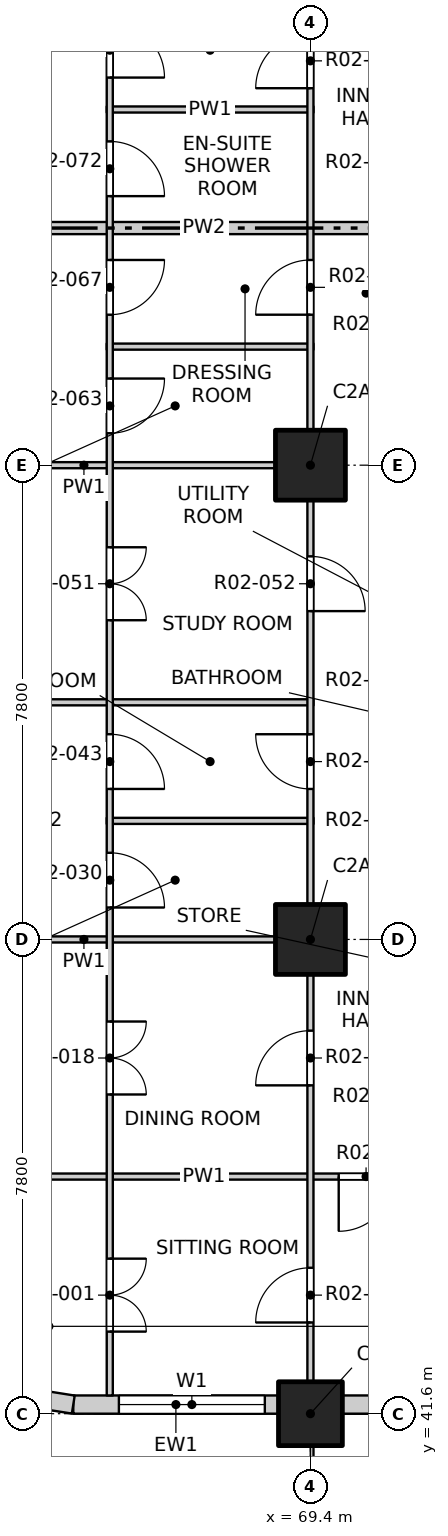
"""IFC4 building model, lengths in metres.
Left out: names, types, materials, properties, quantities, classifications, styles, units other than length and angle.
Written with IfcOpenShell. Run it as: python <this file> out.ifc"""

import sys

from ifc_helpers import new_model, si_unit, direction, frame, frame_2d, origin, origin_2d, place, context, subcontext, project, spatial, rectangle, extrude, element, fill, save


model = new_model("IFC4")
c1 = context("Model", 3, precision=1e-05, world=origin(), true_north=direction((0.0, 1.0)))
c2 = subcontext(c1, "Body", "Model", "MODEL_VIEW")
j1 = project(units=[si_unit("LENGTHUNIT", "METRE"), si_unit("PLANEANGLEUNIT", "RADIAN")], contexts=[c1])
p1 = place(None, origin())
s1 = spatial("IfcSite", under=j1, at=p1, CompositionType="ELEMENT")
p2 = place(p1, origin())
s2 = spatial("IfcBuilding", under=s1, at=p2, CompositionType="ELEMENT")
p3 = place(p2, frame((0.0, 0.0, 29.7)))
s3 = spatial("IfcBuildingStorey", under=s2, at=p3, CompositionType="ELEMENT", Elevation=29.7)
p4 = place(p3, frame((69.4, 41.6, -0.25), z_axis=(0.0, 0.0, 1.0), x_axis=(1.0, 0.0, 0.0)))
e1 = element("IfcColumn", 1, at=p4, inside=s3, PredefinedType="COLUMN", context=c2, shape_type="SweptSolid", body=[
    extrude(rectangle(XDim=1.05, YDim=1.05, at=origin_2d()), origin(), (0.0, 0.0, 1.0), 3.4),
])
for number, where, z_axis, x_axis in (
    (2, (69.4, 49.4, -0.25), (0.0, 0.0, 1.0), (1.0, 0.0, 0.0)),
    (3, (69.4, 57.2, -0.25), (0.0, 0.0, 1.0), (1.0, 0.0, 0.0)),
):
    element("IfcColumn", number, at=place(p3, frame(where, z_axis=z_axis, x_axis=x_axis)), inside=s3, PredefinedType="COLUMN", context=c2, shape_type="SweptSolid", body=[
        extrude(rectangle(XDim=1.15, YDim=1.15, at=origin_2d()), origin(), (0.0, 0.0, 1.0), 3.4),
    ])
p5 = place(p3, frame((65.5, 41.75, 0.0), z_axis=(0.0, 0.0, 1.0), x_axis=(1.0, 0.0, 0.0)))
e4 = element("IfcWall", 4, at=p5, inside=s3, PredefinedType="SOLIDWALL", context=c2, shape_type="SweptSolid", body=[
    extrude(rectangle(XDim=3.375, YDim=0.3, at=frame_2d((1.688, 0.0))), origin(), (0.0, 0.0, 1.0), 2.7),
])
p6 = place(p5, frame((0.75, 0.0, 0.9)))
e5 = element("IfcOpeningElement", 5, at=p6, cuts=e4, PredefinedType="OPENING", context=c2, shape_type="SweptSolid", body=[
    extrude(rectangle(XDim=2.4, YDim=1.8, at=frame_2d((1.2, 0.9))), frame((0.0, 0.16, 0.0), z_axis=(0.0, -1.0, 0.0), x_axis=(1.0, 0.0, 0.0)), (0.0, 0.0, 1.0), 0.32),
])
p7 = place(p3, frame((69.925, 41.75, 0.0), z_axis=(0.0, 0.0, 1.0), x_axis=(1.0, 0.0, 0.0)))
e6 = element("IfcWall", 6, at=p7, inside=s3, PredefinedType="SOLIDWALL", context=c2, shape_type="SweptSolid", body=[
    extrude(rectangle(XDim=6.75, YDim=0.3, at=frame_2d((3.375, 0.0))), origin(), (0.0, 0.0, 1.0), 2.7),
])
p8 = place(p7, frame((0.525, 0.0, 0.0)))
e7 = element("IfcOpeningElement", 7, at=p8, cuts=e6, PredefinedType="OPENING", context=c2, shape_type="SweptSolid", body=[
    extrude(rectangle(XDim=1.8, YDim=2.4, at=frame_2d((0.9, 1.2))), frame((0.0, 0.16, 0.0), z_axis=(0.0, -1.0, 0.0), x_axis=(1.0, 0.0, 0.0)), (0.0, 0.0, 1.0), 0.32),
])
p9 = place(p7, frame((4.125, 0.0, 0.9)))
e8 = element("IfcOpeningElement", 8, at=p9, cuts=e6, PredefinedType="OPENING", context=c2, shape_type="SweptSolid", body=[
    extrude(rectangle(XDim=2.4, YDim=1.8, at=frame_2d((1.2, 0.9))), frame((0.0, 0.16, 0.0), z_axis=(0.0, -1.0, 0.0), x_axis=(1.0, 0.0, 0.0)), (0.0, 0.0, 1.0), 0.32),
])
p10 = place(p3, frame((64.341, 41.934, 0.0), z_axis=(0.0, 0.0, 1.0), x_axis=(0.987678452879, -0.156496880861, 0.0)))
e9 = element("IfcWall", 9, at=p10, inside=s3, PredefinedType="SOLIDWALL", context=c2, shape_type="SweptSolid", body=[
    extrude(rectangle(XDim=1.173, YDim=0.3, at=frame_2d((0.586, 0.0))), origin(), (0.0, 0.0, 1.0), 2.7),
])
p11 = place(p3, frame((61.9, 45.5, 0.0), z_axis=(0.0, 0.0, 1.0), x_axis=(1.0, 0.0, 0.0)))
e10 = element("IfcWall", 10, at=p11, inside=s3, PredefinedType="PARTITIONING", context=c2, shape_type="SweptSolid", body=[
    extrude(rectangle(XDim=11.5, YDim=0.1, at=frame_2d((5.75, 0.0))), origin(), (0.0, 0.0, 1.0), 3.15),
])
p12 = place(p11, frame((7.965, 0.0, 0.0)))
e11 = element("IfcOpeningElement", 11, at=p12, cuts=e10, PredefinedType="OPENING", context=c2, shape_type="SweptSolid", body=[
    extrude(rectangle(XDim=0.9, YDim=2.1, at=frame_2d((0.45, 1.05))), frame((0.0, 0.06, 0.0), z_axis=(0.0, -1.0, 0.0), x_axis=(1.0, 0.0, 0.0)), (0.0, 0.0, 1.0), 0.12),
])
p13 = place(p3, frame((61.9, 49.4, 0.0), z_axis=(0.0, 0.0, 1.0), x_axis=(1.0, 0.0, 0.0)))
e12 = element("IfcWall", 12, at=p13, inside=s3, PredefinedType="PARTITIONING", context=c2, shape_type="SweptSolid", body=[
    extrude(rectangle(XDim=7.55, YDim=0.1, at=frame_2d((3.775, 0.0))), origin(), (0.0, 0.0, 1.0), 2.55),
])
p14 = place(p3, frame((66.05, 51.35, 0.0), z_axis=(0.0, 0.0, 1.0), x_axis=(1.0, 0.0, 0.0)))
e13 = element("IfcWall", 13, at=p14, inside=s3, PredefinedType="PARTITIONING", context=c2, shape_type="SweptSolid", body=[
    extrude(rectangle(XDim=3.4, YDim=0.1, at=frame_2d((1.7, 0.0))), origin(), (0.0, 0.0, 1.0), 3.15),
])
p15 = place(p3, frame((61.9, 53.3, 0.0), z_axis=(0.0, 0.0, 1.0), x_axis=(1.0, 0.0, 0.0)))
e14 = element("IfcWall", 14, at=p15, inside=s3, PredefinedType="PARTITIONING", context=c2, shape_type="SweptSolid", body=[
    extrude(rectangle(XDim=7.55, YDim=0.1, at=frame_2d((3.775, 0.0))), origin(), (0.0, 0.0, 1.0), 3.15),
])
p16 = place(p3, frame((61.9, 57.2, 0.0), z_axis=(0.0, 0.0, 1.0), x_axis=(1.0, 0.0, 0.0)))
e15 = element("IfcWall", 15, at=p16, inside=s3, PredefinedType="PARTITIONING", context=c2, shape_type="SweptSolid", body=[
    extrude(rectangle(XDim=7.55, YDim=0.1, at=frame_2d((3.775, 0.0))), origin(), (0.0, 0.0, 1.0), 2.55),
])
p17 = place(p3, frame((66.05, 59.15, 0.0), z_axis=(0.0, 0.0, 1.0), x_axis=(1.0, 0.0, 0.0)))
e16 = element("IfcWall", 16, at=p17, inside=s3, PredefinedType="PARTITIONING", context=c2, shape_type="SweptSolid", body=[
    extrude(rectangle(XDim=3.4, YDim=0.1, at=frame_2d((1.7, 0.0))), origin(), (0.0, 0.0, 1.0), 3.15),
])
p18 = place(p3, frame((61.9, 61.1, 0.0), z_axis=(0.0, 0.0, 1.0), x_axis=(1.0, 0.0, 0.0)))
e17 = element("IfcWall", 17, at=p18, inside=s3, PredefinedType="PARTITIONING", context=c2, shape_type="SweptSolid", body=[
    extrude(rectangle(XDim=11.5, YDim=0.2, at=frame_2d((5.75, 0.0))), origin(), (0.0, 0.0, 1.0), 3.15),
])
p19 = place(p3, frame((66.05, 63.05, 0.0), z_axis=(0.0, 0.0, 1.0), x_axis=(1.0, 0.0, 0.0)))
e18 = element("IfcWall", 18, at=p19, inside=s3, PredefinedType="PARTITIONING", context=c2, shape_type="SweptSolid", body=[
    extrude(rectangle(XDim=3.4, YDim=0.1, at=frame_2d((1.7, 0.0))), origin(), (0.0, 0.0, 1.0), 3.15),
])
p20 = place(p3, frame((66.1, 41.9, 0.0), z_axis=(0.0, 0.0, 1.0), x_axis=(0.0, 1.0, 0.0)))
e19 = element("IfcWall", 19, at=p20, inside=s3, PredefinedType="PARTITIONING", context=c2, shape_type="SweptSolid", body=[
    extrude(rectangle(XDim=34.7, YDim=0.1, at=frame_2d((17.35, 0.0))), origin(), (0.0, 0.0, 1.0), 3.15),
])
p21 = place(p20, frame((1.05, 0.0, 0.0)))
e20 = element("IfcOpeningElement", 20, at=p21, cuts=e19, PredefinedType="OPENING", context=c2, shape_type="SweptSolid", body=[
    extrude(rectangle(XDim=1.2, YDim=2.1, at=frame_2d((0.6, 1.05))), frame((0.0, 0.06, 0.0), z_axis=(0.0, -1.0, 0.0), x_axis=(1.0, 0.0, 0.0)), (0.0, 0.0, 1.0), 0.12),
])
p22 = place(p20, frame((4.95, 0.0, 0.0)))
e21 = element("IfcOpeningElement", 21, at=p22, cuts=e19, PredefinedType="OPENING", context=c2, shape_type="SweptSolid", body=[
    extrude(rectangle(XDim=1.2, YDim=2.1, at=frame_2d((0.6, 1.05))), frame((0.0, 0.06, 0.0), z_axis=(0.0, -1.0, 0.0), x_axis=(1.0, 0.0, 0.0)), (0.0, 0.0, 1.0), 0.12),
])
p23 = place(p20, frame((8.025, 0.0, 0.0)))
e22 = element("IfcOpeningElement", 22, at=p23, cuts=e19, PredefinedType="OPENING", context=c2, shape_type="SweptSolid", body=[
    extrude(rectangle(XDim=0.9, YDim=2.1, at=frame_2d((0.45, 1.05))), frame((0.0, 0.06, 0.0), z_axis=(0.0, -1.0, 0.0), x_axis=(1.0, 0.0, 0.0)), (0.0, 0.0, 1.0), 0.12),
])
p24 = place(p20, frame((9.975, 0.0, 0.0)))
e23 = element("IfcOpeningElement", 23, at=p24, cuts=e19, PredefinedType="OPENING", context=c2, shape_type="SweptSolid", body=[
    extrude(rectangle(XDim=0.9, YDim=2.1, at=frame_2d((0.45, 1.05))), frame((0.0, 0.06, 0.0), z_axis=(0.0, -1.0, 0.0), x_axis=(1.0, 0.0, 0.0)), (0.0, 0.0, 1.0), 0.12),
])
p25 = place(p20, frame((12.75, 0.0, 0.0)))
e24 = element("IfcOpeningElement", 24, at=p25, cuts=e19, PredefinedType="OPENING", context=c2, shape_type="SweptSolid", body=[
    extrude(rectangle(XDim=1.2, YDim=2.1, at=frame_2d((0.6, 1.05))), frame((0.0, 0.06, 0.0), z_axis=(0.0, -1.0, 0.0), x_axis=(1.0, 0.0, 0.0)), (0.0, 0.0, 1.0), 0.12),
])
p26 = place(p20, frame((15.825, 0.0, 0.0)))
e25 = element("IfcOpeningElement", 25, at=p26, cuts=e19, PredefinedType="OPENING", context=c2, shape_type="SweptSolid", body=[
    extrude(rectangle(XDim=0.9, YDim=2.1, at=frame_2d((0.45, 1.05))), frame((0.0, 0.06, 0.0), z_axis=(0.0, -1.0, 0.0), x_axis=(1.0, 0.0, 0.0)), (0.0, 0.0, 1.0), 0.12),
])
p27 = place(p20, frame((17.775, 0.0, 0.0)))
e26 = element("IfcOpeningElement", 26, at=p27, cuts=e19, PredefinedType="OPENING", context=c2, shape_type="SweptSolid", body=[
    extrude(rectangle(XDim=0.9, YDim=2.1, at=frame_2d((0.45, 1.05))), frame((0.0, 0.06, 0.0), z_axis=(0.0, -1.0, 0.0), x_axis=(1.0, 0.0, 0.0)), (0.0, 0.0, 1.0), 0.12),
])
p28 = place(p20, frame((19.725, 0.0, 0.0)))
e27 = element("IfcOpeningElement", 27, at=p28, cuts=e19, PredefinedType="OPENING", context=c2, shape_type="SweptSolid", body=[
    extrude(rectangle(XDim=0.9, YDim=2.1, at=frame_2d((0.45, 1.05))), frame((0.0, 0.06, 0.0), z_axis=(0.0, -1.0, 0.0), x_axis=(1.0, 0.0, 0.0)), (0.0, 0.0, 1.0), 0.12),
])
p29 = place(p20, frame((21.675, 0.0, 0.0)))
e28 = element("IfcOpeningElement", 28, at=p29, cuts=e19, PredefinedType="OPENING", context=c2, shape_type="SweptSolid", body=[
    extrude(rectangle(XDim=0.9, YDim=2.1, at=frame_2d((0.45, 1.05))), frame((0.0, 0.06, 0.0), z_axis=(0.0, -1.0, 0.0), x_axis=(1.0, 0.0, 0.0)), (0.0, 0.0, 1.0), 0.12),
])
p30 = place(p20, frame((24.45, 0.0, 0.0)))
e29 = element("IfcOpeningElement", 29, at=p30, cuts=e19, PredefinedType="OPENING", context=c2, shape_type="SweptSolid", body=[
    extrude(rectangle(XDim=1.2, YDim=2.1, at=frame_2d((0.6, 1.05))), frame((0.0, 0.06, 0.0), z_axis=(0.0, -1.0, 0.0), x_axis=(1.0, 0.0, 0.0)), (0.0, 0.0, 1.0), 0.12),
])
p31 = place(p20, frame((27.525, 0.0, 0.0)))
e30 = element("IfcOpeningElement", 30, at=p31, cuts=e19, PredefinedType="OPENING", context=c2, shape_type="SweptSolid", body=[
    extrude(rectangle(XDim=0.9, YDim=2.1, at=frame_2d((0.45, 1.05))), frame((0.0, 0.06, 0.0), z_axis=(0.0, -1.0, 0.0), x_axis=(1.0, 0.0, 0.0)), (0.0, 0.0, 1.0), 0.12),
])
p32 = place(p20, frame((29.475, 0.0, 0.0)))
e31 = element("IfcOpeningElement", 31, at=p32, cuts=e19, PredefinedType="OPENING", context=c2, shape_type="SweptSolid", body=[
    extrude(rectangle(XDim=0.9, YDim=2.1, at=frame_2d((0.45, 1.05))), frame((0.0, 0.06, 0.0), z_axis=(0.0, -1.0, 0.0), x_axis=(1.0, 0.0, 0.0)), (0.0, 0.0, 1.0), 0.12),
])
p33 = place(p20, frame((31.425, 0.0, 0.0)))
e32 = element("IfcOpeningElement", 32, at=p33, cuts=e19, PredefinedType="OPENING", context=c2, shape_type="SweptSolid", body=[
    extrude(rectangle(XDim=0.9, YDim=2.1, at=frame_2d((0.45, 1.05))), frame((0.0, 0.06, 0.0), z_axis=(0.0, -1.0, 0.0), x_axis=(1.0, 0.0, 0.0)), (0.0, 0.0, 1.0), 0.12),
])
p34 = place(p20, frame((33.375, 0.0, 0.0)))
e33 = element("IfcOpeningElement", 33, at=p34, cuts=e19, PredefinedType="OPENING", context=c2, shape_type="SweptSolid", body=[
    extrude(rectangle(XDim=0.9, YDim=2.1, at=frame_2d((0.45, 1.05))), frame((0.0, 0.06, 0.0), z_axis=(0.0, -1.0, 0.0), x_axis=(1.0, 0.0, 0.0)), (0.0, 0.0, 1.0), 0.12),
])
p35 = place(p3, frame((69.4, 41.9, 0.0), z_axis=(0.0, 0.0, 1.0), x_axis=(0.0, 1.0, 0.0)))
e34 = element("IfcWall", 34, at=p35, inside=s3, PredefinedType="PARTITIONING", context=c2, shape_type="SweptSolid", body=[
    extrude(rectangle(XDim=7.5, YDim=0.1, at=frame_2d((3.75, 0.0))), origin(), (0.0, 0.0, 1.0), 2.55),
])
p36 = place(p35, frame((1.2, 0.0, 0.0)))
e35 = element("IfcOpeningElement", 35, at=p36, cuts=e34, PredefinedType="OPENING", context=c2, shape_type="SweptSolid", body=[
    extrude(rectangle(XDim=0.9, YDim=2.1, at=frame_2d((0.45, 1.05))), frame((0.0, 0.06, 0.0), z_axis=(0.0, -1.0, 0.0), x_axis=(1.0, 0.0, 0.0)), (0.0, 0.0, 1.0), 0.12),
])
p37 = place(p35, frame((5.1, 0.0, 0.0)))
e36 = element("IfcOpeningElement", 36, at=p37, cuts=e34, PredefinedType="OPENING", context=c2, shape_type="SweptSolid", body=[
    extrude(rectangle(XDim=0.9, YDim=2.1, at=frame_2d((0.45, 1.05))), frame((0.0, 0.06, 0.0), z_axis=(0.0, -1.0, 0.0), x_axis=(1.0, 0.0, 0.0)), (0.0, 0.0, 1.0), 0.12),
])
p38 = place(p3, frame((69.4, 49.4, 0.0), z_axis=(0.0, 0.0, 1.0), x_axis=(0.0, 1.0, 0.0)))
e37 = element("IfcWall", 37, at=p38, inside=s3, PredefinedType="PARTITIONING", context=c2, shape_type="SweptSolid", body=[
    extrude(rectangle(XDim=31.2, YDim=0.1, at=frame_2d((15.6, 0.0))), origin(), (0.0, 0.0, 1.0), 3.15),
])
p39 = place(p38, frame((2.475, 0.0, 0.0)))
e38 = element("IfcOpeningElement", 38, at=p39, cuts=e37, PredefinedType="OPENING", context=c2, shape_type="SweptSolid", body=[
    extrude(rectangle(XDim=0.9, YDim=2.1, at=frame_2d((0.45, 1.05))), frame((0.0, 0.06, 0.0), z_axis=(0.0, -1.0, 0.0), x_axis=(1.0, 0.0, 0.0)), (0.0, 0.0, 1.0), 0.12),
])
p40 = place(p38, frame((5.4, 0.0, 0.0)))
e39 = element("IfcOpeningElement", 39, at=p40, cuts=e37, PredefinedType="OPENING", context=c2, shape_type="SweptSolid", body=[
    extrude(rectangle(XDim=0.9, YDim=2.1, at=frame_2d((0.45, 1.05))), frame((0.0, 0.06, 0.0), z_axis=(0.0, -1.0, 0.0), x_axis=(1.0, 0.0, 0.0)), (0.0, 0.0, 1.0), 0.12),
])
p41 = place(p38, frame((10.275, 0.0, 0.0)))
e40 = element("IfcOpeningElement", 40, at=p41, cuts=e37, PredefinedType="OPENING", context=c2, shape_type="SweptSolid", body=[
    extrude(rectangle(XDim=0.9, YDim=2.1, at=frame_2d((0.45, 1.05))), frame((0.0, 0.06, 0.0), z_axis=(0.0, -1.0, 0.0), x_axis=(1.0, 0.0, 0.0)), (0.0, 0.0, 1.0), 0.12),
])
p42 = place(p38, frame((14.0, 0.0, 0.0)))
e41 = element("IfcOpeningElement", 41, at=p42, cuts=e37, PredefinedType="OPENING", context=c2, shape_type="SweptSolid", body=[
    extrude(rectangle(XDim=0.9, YDim=2.1, at=frame_2d((0.45, 1.05))), frame((0.0, 0.06, 0.0), z_axis=(0.0, -1.0, 0.0), x_axis=(1.0, 0.0, 0.0)), (0.0, 0.0, 1.0), 0.12),
])
p43 = place(p38, frame((17.1, 0.0, 0.0)))
e42 = element("IfcOpeningElement", 42, at=p43, cuts=e37, PredefinedType="OPENING", context=c2, shape_type="SweptSolid", body=[
    extrude(rectangle(XDim=0.9, YDim=2.1, at=frame_2d((0.45, 1.05))), frame((0.0, 0.06, 0.0), z_axis=(0.0, -1.0, 0.0), x_axis=(1.0, 0.0, 0.0)), (0.0, 0.0, 1.0), 0.12),
])
p44 = place(p38, frame((21.8, 0.0, 0.0)))
e43 = element("IfcOpeningElement", 43, at=p44, cuts=e37, PredefinedType="OPENING", context=c2, shape_type="SweptSolid", body=[
    extrude(rectangle(XDim=0.9, YDim=2.1, at=frame_2d((0.45, 1.05))), frame((0.0, 0.06, 0.0), z_axis=(0.0, -1.0, 0.0), x_axis=(1.0, 0.0, 0.0)), (0.0, 0.0, 1.0), 0.12),
])
p45 = place(p38, frame((25.875, 0.0, 0.0)))
e44 = element("IfcOpeningElement", 44, at=p45, cuts=e37, PredefinedType="OPENING", context=c2, shape_type="SweptSolid", body=[
    extrude(rectangle(XDim=0.9, YDim=2.1, at=frame_2d((0.45, 1.05))), frame((0.0, 0.06, 0.0), z_axis=(0.0, -1.0, 0.0), x_axis=(1.0, 0.0, 0.0)), (0.0, 0.0, 1.0), 0.12),
])
p46 = place(p38, frame((29.6, 0.0, 0.0)))
e45 = element("IfcOpeningElement", 45, at=p46, cuts=e37, PredefinedType="OPENING", context=c2, shape_type="SweptSolid", body=[
    extrude(rectangle(XDim=0.9, YDim=2.1, at=frame_2d((0.45, 1.05))), frame((0.0, 0.06, 0.0), z_axis=(0.0, -1.0, 0.0), x_axis=(1.0, 0.0, 0.0)), (0.0, 0.0, 1.0), 0.12),
])
p47 = place(p6, origin())
e46 = element("IfcWindow", 46, at=p47, inside=s3, PartitioningType="DOUBLE_PANEL_VERTICAL", PredefinedType="WINDOW", context=c2, shape_type="SweptSolid", body=[
    extrude(rectangle(XDim=2.4, YDim=1.8, at=frame_2d((1.2, 0.9))), frame((0.0, 0.03, 0.0), z_axis=(0.0, -1.0, 0.0), x_axis=(1.0, 0.0, 0.0)), (0.0, 0.0, 1.0), 0.06),
])
fill(e5, e46)
p48 = place(p21, origin())
e47 = element("IfcDoor", 47, at=p48, inside=s3, OperationType="DOUBLE_DOOR_SINGLE_SWING", PredefinedType="DOOR", context=c2, shape_type="SweptSolid", body=[
    extrude(rectangle(XDim=1.2, YDim=2.1, at=frame_2d((0.6, 1.05))), frame((0.0, 0.025, 0.0), z_axis=(0.0, -1.0, 0.0), x_axis=(1.0, 0.0, 0.0)), (0.0, 0.0, 1.0), 0.05),
])
fill(e20, e47)
p49 = place(p36, origin())
e48 = element("IfcDoor", 48, at=p49, inside=s3, OperationType="SINGLE_SWING_LEFT", PredefinedType="DOOR", context=c2, shape_type="SweptSolid", body=[
    extrude(rectangle(XDim=0.9, YDim=2.1, at=frame_2d((0.45, 1.05))), frame((0.0, 0.025, 0.0), z_axis=(0.0, -1.0, 0.0), x_axis=(1.0, 0.0, 0.0)), (0.0, 0.0, 1.0), 0.05),
])
fill(e35, e48)
p50 = place(p12, origin())
e49 = element("IfcDoor", 49, at=p50, inside=s3, OperationType="SINGLE_SWING_RIGHT", PredefinedType="DOOR", context=c2, shape_type="SweptSolid", body=[
    extrude(rectangle(XDim=0.9, YDim=2.1, at=frame_2d((0.45, 1.05))), frame((0.0, 0.025, 0.0), z_axis=(0.0, -1.0, 0.0), x_axis=(1.0, 0.0, 0.0)), (0.0, 0.0, 1.0), 0.05),
])
fill(e11, e49)
p51 = place(p22, origin())
e50 = element("IfcDoor", 50, at=p51, inside=s3, OperationType="DOUBLE_DOOR_SINGLE_SWING", PredefinedType="DOOR", context=c2, shape_type="SweptSolid", body=[
    extrude(rectangle(XDim=1.2, YDim=2.1, at=frame_2d((0.6, 1.05))), frame((0.0, 0.025, 0.0), z_axis=(0.0, -1.0, 0.0), x_axis=(1.0, 0.0, 0.0)), (0.0, 0.0, 1.0), 0.05),
])
fill(e21, e50)
p52 = place(p37, origin())
e51 = element("IfcDoor", 51, at=p52, inside=s3, OperationType="SINGLE_SWING_LEFT", PredefinedType="DOOR", context=c2, shape_type="SweptSolid", body=[
    extrude(rectangle(XDim=0.9, YDim=2.1, at=frame_2d((0.45, 1.05))), frame((0.0, 0.025, 0.0), z_axis=(0.0, -1.0, 0.0), x_axis=(1.0, 0.0, 0.0)), (0.0, 0.0, 1.0), 0.05),
])
fill(e36, e51)
p53 = place(p23, origin())
e52 = element("IfcDoor", 52, at=p53, inside=s3, OperationType="SINGLE_SWING_RIGHT", PredefinedType="DOOR", context=c2, shape_type="SweptSolid", body=[
    extrude(rectangle(XDim=0.9, YDim=2.1, at=frame_2d((0.45, 1.05))), frame((0.0, 0.025, 0.0), z_axis=(0.0, -1.0, 0.0), x_axis=(1.0, 0.0, 0.0)), (0.0, 0.0, 1.0), 0.05),
])
fill(e22, e52)
p54 = place(p24, origin())
e53 = element("IfcDoor", 53, at=p54, inside=s3, OperationType="SINGLE_SWING_RIGHT", PredefinedType="DOOR", context=c2, shape_type="SweptSolid", body=[
    extrude(rectangle(XDim=0.9, YDim=2.1, at=frame_2d((0.45, 1.05))), frame((0.0, 0.025, 0.0), z_axis=(0.0, -1.0, 0.0), x_axis=(1.0, 0.0, 0.0)), (0.0, 0.0, 1.0), 0.05),
])
fill(e23, e53)
p55 = place(p39, origin())
e54 = element("IfcDoor", 54, at=p55, inside=s3, OperationType="SINGLE_SWING_RIGHT", PredefinedType="DOOR", context=c2, shape_type="SweptSolid", body=[
    extrude(rectangle(XDim=0.9, YDim=2.1, at=frame_2d((0.45, 1.05))), frame((0.0, 0.025, 0.0), z_axis=(0.0, -1.0, 0.0), x_axis=(1.0, 0.0, 0.0)), (0.0, 0.0, 1.0), 0.05),
])
fill(e38, e54)
p56 = place(p25, origin())
e55 = element("IfcDoor", 55, at=p56, inside=s3, OperationType="DOUBLE_DOOR_SINGLE_SWING", PredefinedType="DOOR", context=c2, shape_type="SweptSolid", body=[
    extrude(rectangle(XDim=1.2, YDim=2.1, at=frame_2d((0.6, 1.05))), frame((0.0, 0.025, 0.0), z_axis=(0.0, -1.0, 0.0), x_axis=(1.0, 0.0, 0.0)), (0.0, 0.0, 1.0), 0.05),
])
fill(e24, e55)
p57 = place(p40, origin())
e56 = element("IfcDoor", 56, at=p57, inside=s3, OperationType="SINGLE_SWING_RIGHT", PredefinedType="DOOR", context=c2, shape_type="SweptSolid", body=[
    extrude(rectangle(XDim=0.9, YDim=2.1, at=frame_2d((0.45, 1.05))), frame((0.0, 0.025, 0.0), z_axis=(0.0, -1.0, 0.0), x_axis=(1.0, 0.0, 0.0)), (0.0, 0.0, 1.0), 0.05),
])
fill(e39, e56)
p58 = place(p26, origin())
e57 = element("IfcDoor", 57, at=p58, inside=s3, OperationType="SINGLE_SWING_LEFT", PredefinedType="DOOR", context=c2, shape_type="SweptSolid", body=[
    extrude(rectangle(XDim=0.9, YDim=2.1, at=frame_2d((0.45, 1.05))), frame((0.0, 0.025, 0.0), z_axis=(0.0, -1.0, 0.0), x_axis=(1.0, 0.0, 0.0)), (0.0, 0.0, 1.0), 0.05),
])
fill(e25, e57)
p59 = place(p27, origin())
e58 = element("IfcDoor", 58, at=p59, inside=s3, OperationType="SINGLE_SWING_LEFT", PredefinedType="DOOR", context=c2, shape_type="SweptSolid", body=[
    extrude(rectangle(XDim=0.9, YDim=2.1, at=frame_2d((0.45, 1.05))), frame((0.0, 0.025, 0.0), z_axis=(0.0, -1.0, 0.0), x_axis=(1.0, 0.0, 0.0)), (0.0, 0.0, 1.0), 0.05),
])
fill(e26, e58)
p60 = place(p41, origin())
e59 = element("IfcDoor", 59, at=p60, inside=s3, OperationType="SINGLE_SWING_LEFT", PredefinedType="DOOR", context=c2, shape_type="SweptSolid", body=[
    extrude(rectangle(XDim=0.9, YDim=2.1, at=frame_2d((0.45, 1.05))), frame((0.0, 0.025, 0.0), z_axis=(0.0, -1.0, 0.0), x_axis=(1.0, 0.0, 0.0)), (0.0, 0.0, 1.0), 0.05),
])
fill(e40, e59)
p61 = place(p28, origin())
e60 = element("IfcDoor", 60, at=p61, inside=s3, OperationType="SINGLE_SWING_RIGHT", PredefinedType="DOOR", context=c2, shape_type="SweptSolid", body=[
    extrude(rectangle(XDim=0.9, YDim=2.1, at=frame_2d((0.45, 1.05))), frame((0.0, 0.025, 0.0), z_axis=(0.0, -1.0, 0.0), x_axis=(1.0, 0.0, 0.0)), (0.0, 0.0, 1.0), 0.05),
])
fill(e27, e60)
p62 = place(p42, origin())
e61 = element("IfcDoor", 61, at=p62, inside=s3, OperationType="SINGLE_SWING_LEFT", PredefinedType="DOOR", context=c2, shape_type="SweptSolid", body=[
    extrude(rectangle(XDim=0.9, YDim=2.1, at=frame_2d((0.45, 1.05))), frame((0.0, 0.025, 0.0), z_axis=(0.0, -1.0, 0.0), x_axis=(1.0, 0.0, 0.0)), (0.0, 0.0, 1.0), 0.05),
])
fill(e41, e61)
p63 = place(p29, origin())
e62 = element("IfcDoor", 62, at=p63, inside=s3, OperationType="SINGLE_SWING_RIGHT", PredefinedType="DOOR", context=c2, shape_type="SweptSolid", body=[
    extrude(rectangle(XDim=0.9, YDim=2.1, at=frame_2d((0.45, 1.05))), frame((0.0, 0.025, 0.0), z_axis=(0.0, -1.0, 0.0), x_axis=(1.0, 0.0, 0.0)), (0.0, 0.0, 1.0), 0.05),
])
fill(e28, e62)
save(model, sys.argv[1])
